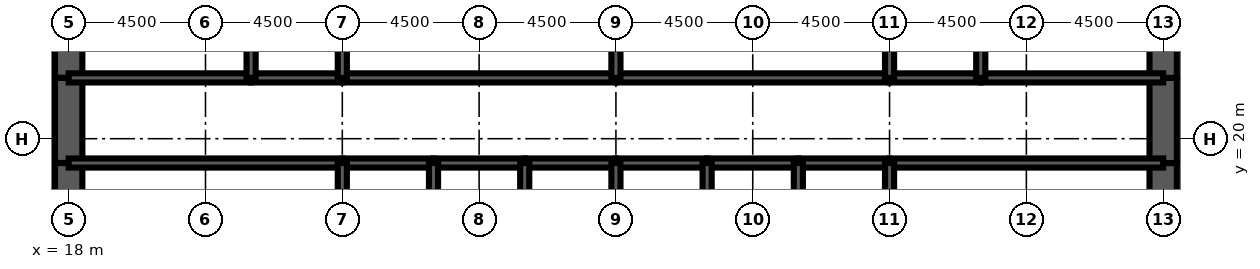
"""IFC4 building model, lengths in metres.
Left out: names, types, materials, properties, quantities, classifications, styles, units other than length and angle.
Written with IfcOpenShell. Run it as: python <this file> out.ifc"""

import sys

from ifc_helpers import new_model, si_unit, direction, frame, frame_2d, origin, place, context, subcontext, project, spatial, rectangle, extrude, element, fill, save


model = new_model("IFC4")
c1 = context("Model", 3, precision=1e-05, world=origin(), true_north=direction((0.0, 1.0)))
c2 = subcontext(c1, "Body", "Model", "MODEL_VIEW")
j1 = project(units=[si_unit("LENGTHUNIT", "METRE"), si_unit("PLANEANGLEUNIT", "RADIAN")], contexts=[c1])
p1 = place(None, origin())
s1 = spatial("IfcSite", under=j1, at=p1, CompositionType="ELEMENT")
p2 = place(p1, origin())
s2 = spatial("IfcBuilding", under=s1, at=p2, CompositionType="ELEMENT")
p3 = place(p2, origin())
s3 = spatial("IfcBuildingStorey", under=s2, at=p3, CompositionType="ELEMENT", Elevation=0.0)
p4 = place(p3, frame((18.0, 26.0, 0.0), z_axis=(0.0, 0.0, 1.0), x_axis=(0.0, -1.0, 0.0)))
e1 = element("IfcWall", 1, at=p4, inside=s3, PredefinedType="SHEAR", context=c2, shape_type="SweptSolid", body=[
    extrude(rectangle(XDim=4.0, YDim=0.9, at=frame_2d((2.0, 0.0))), origin(), (0.0, 0.0, 1.0), 6.0),
])
p5 = place(p3, frame((18.0, 22.0, 0.0), z_axis=(0.0, 0.0, 1.0), x_axis=(0.0, -1.0, 0.0)))
e2 = element("IfcWall", 2, at=p5, inside=s3, PredefinedType="SHEAR", context=c2, shape_type="SweptSolid", body=[
    extrude(rectangle(XDim=2.8, YDim=0.9, at=frame_2d((1.4, 0.0))), origin(), (0.0, 0.0, 1.0), 6.0),
])
p6 = place(p5, frame((0.6, 0.0, 0.0)))
e3 = element("IfcOpeningElement", 3, at=p6, cuts=e2, PredefinedType="OPENING", context=c2, shape_type="SweptSolid", body=[
    extrude(rectangle(XDim=1.8, YDim=2.1, at=frame_2d((0.9, 1.05))), frame((0.0, 0.46, 0.0), z_axis=(0.0, -1.0, 0.0), x_axis=(1.0, 0.0, 0.0)), (0.0, 0.0, 1.0), 0.92),
])
for number, where, z_axis, x_axis in (
    (4, (18.0, 19.2, 0.0), (0.0, 0.0, 1.0), (0.0, -1.0, 0.0)),
    (5, (54.0, 16.0, 0.0), (0.0, 0.0, 1.0), (0.0, 1.0, 0.0)),
):
    element("IfcWall", number, at=place(p3, frame(where, z_axis=z_axis, x_axis=x_axis)), inside=s3, PredefinedType="SHEAR", context=c2, shape_type="SweptSolid", body=[
        extrude(rectangle(XDim=3.2, YDim=0.9, at=frame_2d((1.6, 0.0))), origin(), (0.0, 0.0, 1.0), 6.0),
    ])
p7 = place(p3, frame((54.0, 19.2, 0.0), z_axis=(0.0, 0.0, 1.0), x_axis=(0.0, 1.0, 0.0)))
e6 = element("IfcWall", 6, at=p7, inside=s3, PredefinedType="SHEAR", context=c2, shape_type="SweptSolid", body=[
    extrude(rectangle(XDim=2.8, YDim=0.9, at=frame_2d((1.4, 0.0))), origin(), (0.0, 0.0, 1.0), 6.0),
])
p8 = place(p7, frame((0.4, 0.0, 0.0)))
e7 = element("IfcOpeningElement", 7, at=p8, cuts=e6, PredefinedType="OPENING", context=c2, shape_type="SweptSolid", body=[
    extrude(rectangle(XDim=1.8, YDim=2.1, at=frame_2d((0.9, 1.05))), frame((0.0, 0.46, 0.0), z_axis=(0.0, -1.0, 0.0), x_axis=(1.0, 0.0, 0.0)), (0.0, 0.0, 1.0), 0.92),
])
p9 = place(p3, frame((54.0, 22.0, 0.0), z_axis=(0.0, 0.0, 1.0), x_axis=(0.0, 1.0, 0.0)))
e8 = element("IfcWall", 8, at=p9, inside=s3, PredefinedType="SHEAR", context=c2, shape_type="SweptSolid", body=[
    extrude(rectangle(XDim=4.0, YDim=0.9, at=frame_2d((2.0, 0.0))), origin(), (0.0, 0.0, 1.0), 6.0),
])
p10 = place(p3, frame((18.0, 19.2, 0.0), z_axis=(0.0, 0.0, 1.0), x_axis=(1.0, 0.0, 0.0)))
e9 = element("IfcWall", 9, at=p10, inside=s3, PredefinedType="SOLIDWALL", context=c2, shape_type="SweptSolid", body=[
    extrude(rectangle(XDim=9.0, YDim=0.3, at=frame_2d((4.5, 0.0))), origin(), (0.0, 0.0, 1.0), 6.0),
])
p11 = place(p10, frame((0.65, 0.0, 0.0)))
e10 = element("IfcOpeningElement", 10, at=p11, cuts=e9, PredefinedType="OPENING", context=c2, shape_type="SweptSolid", body=[
    extrude(rectangle(XDim=1.0, YDim=2.1, at=frame_2d((0.5, 1.05))), frame((0.0, 0.16, 0.0), z_axis=(0.0, -1.0, 0.0), x_axis=(1.0, 0.0, 0.0)), (0.0, 0.0, 1.0), 0.32),
])
p12 = place(p3, frame((27.0, 19.2, 0.0), z_axis=(0.0, 0.0, 1.0), x_axis=(1.0, 0.0, 0.0)))
e11 = element("IfcWall", 11, at=p12, inside=s3, PredefinedType="SOLIDWALL", context=c2, shape_type="SweptSolid", body=[
    extrude(rectangle(XDim=3.0, YDim=0.3, at=frame_2d((1.5, 0.0))), origin(), (0.0, 0.0, 1.0), 6.0),
])
p13 = place(p12, frame((0.95, 0.0, 0.0)))
e12 = element("IfcOpeningElement", 12, at=p13, cuts=e11, PredefinedType="OPENING", context=c2, shape_type="SweptSolid", body=[
    extrude(rectangle(XDim=1.1, YDim=2.2, at=frame_2d((0.55, 1.1))), frame((0.0, 0.16, 0.0), z_axis=(0.0, -1.0, 0.0), x_axis=(1.0, 0.0, 0.0)), (0.0, 0.0, 1.0), 0.32),
])
p14 = place(p3, frame((30.0, 19.2, 0.0), z_axis=(0.0, 0.0, 1.0), x_axis=(1.0, 0.0, 0.0)))
e13 = element("IfcWall", 13, at=p14, inside=s3, PredefinedType="SOLIDWALL", context=c2, shape_type="SweptSolid", body=[
    extrude(rectangle(XDim=3.0, YDim=0.3, at=frame_2d((1.5, 0.0))), origin(), (0.0, 0.0, 1.0), 6.0),
])
p15 = place(p14, frame((0.95, 0.0, 0.0)))
e14 = element("IfcOpeningElement", 14, at=p15, cuts=e13, PredefinedType="OPENING", context=c2, shape_type="SweptSolid", body=[
    extrude(rectangle(XDim=1.1, YDim=2.2, at=frame_2d((0.55, 1.1))), frame((0.0, 0.16, 0.0), z_axis=(0.0, -1.0, 0.0), x_axis=(1.0, 0.0, 0.0)), (0.0, 0.0, 1.0), 0.32),
])
p16 = place(p3, frame((33.0, 19.2, 0.0), z_axis=(0.0, 0.0, 1.0), x_axis=(1.0, 0.0, 0.0)))
e15 = element("IfcWall", 15, at=p16, inside=s3, PredefinedType="SOLIDWALL", context=c2, shape_type="SweptSolid", body=[
    extrude(rectangle(XDim=3.0, YDim=0.3, at=frame_2d((1.5, 0.0))), origin(), (0.0, 0.0, 1.0), 6.0),
])
p17 = place(p16, frame((0.95, 0.0, 0.0)))
e16 = element("IfcOpeningElement", 16, at=p17, cuts=e15, PredefinedType="OPENING", context=c2, shape_type="SweptSolid", body=[
    extrude(rectangle(XDim=1.1, YDim=2.2, at=frame_2d((0.55, 1.1))), frame((0.0, 0.16, 0.0), z_axis=(0.0, -1.0, 0.0), x_axis=(1.0, 0.0, 0.0)), (0.0, 0.0, 1.0), 0.32),
])
p18 = place(p3, frame((36.0, 19.2, 0.0), z_axis=(0.0, 0.0, 1.0), x_axis=(1.0, 0.0, 0.0)))
e17 = element("IfcWall", 17, at=p18, inside=s3, PredefinedType="SOLIDWALL", context=c2, shape_type="SweptSolid", body=[
    extrude(rectangle(XDim=3.0, YDim=0.3, at=frame_2d((1.5, 0.0))), origin(), (0.0, 0.0, 1.0), 6.0),
])
p19 = place(p18, frame((0.95, 0.0, 0.0)))
e18 = element("IfcOpeningElement", 18, at=p19, cuts=e17, PredefinedType="OPENING", context=c2, shape_type="SweptSolid", body=[
    extrude(rectangle(XDim=1.1, YDim=2.2, at=frame_2d((0.55, 1.1))), frame((0.0, 0.16, 0.0), z_axis=(0.0, -1.0, 0.0), x_axis=(1.0, 0.0, 0.0)), (0.0, 0.0, 1.0), 0.32),
])
p20 = place(p3, frame((39.0, 19.2, 0.0), z_axis=(0.0, 0.0, 1.0), x_axis=(1.0, 0.0, 0.0)))
e19 = element("IfcWall", 19, at=p20, inside=s3, PredefinedType="SOLIDWALL", context=c2, shape_type="SweptSolid", body=[
    extrude(rectangle(XDim=3.0, YDim=0.3, at=frame_2d((1.5, 0.0))), origin(), (0.0, 0.0, 1.0), 6.0),
])
p21 = place(p20, frame((0.95, 0.0, 0.0)))
e20 = element("IfcOpeningElement", 20, at=p21, cuts=e19, PredefinedType="OPENING", context=c2, shape_type="SweptSolid", body=[
    extrude(rectangle(XDim=1.1, YDim=2.2, at=frame_2d((0.55, 1.1))), frame((0.0, 0.16, 0.0), z_axis=(0.0, -1.0, 0.0), x_axis=(1.0, 0.0, 0.0)), (0.0, 0.0, 1.0), 0.32),
])
p22 = place(p3, frame((42.0, 19.2, 0.0), z_axis=(0.0, 0.0, 1.0), x_axis=(1.0, 0.0, 0.0)))
e21 = element("IfcWall", 21, at=p22, inside=s3, PredefinedType="SOLIDWALL", context=c2, shape_type="SweptSolid", body=[
    extrude(rectangle(XDim=3.0, YDim=0.3, at=frame_2d((1.5, 0.0))), origin(), (0.0, 0.0, 1.0), 6.0),
])
p23 = place(p22, frame((0.95, 0.0, 0.0)))
e22 = element("IfcOpeningElement", 22, at=p23, cuts=e21, PredefinedType="OPENING", context=c2, shape_type="SweptSolid", body=[
    extrude(rectangle(XDim=1.1, YDim=2.2, at=frame_2d((0.55, 1.1))), frame((0.0, 0.16, 0.0), z_axis=(0.0, -1.0, 0.0), x_axis=(1.0, 0.0, 0.0)), (0.0, 0.0, 1.0), 0.32),
])
p24 = place(p3, frame((45.0, 19.2, 0.0), z_axis=(0.0, 0.0, 1.0), x_axis=(1.0, 0.0, 0.0)))
e23 = element("IfcWall", 23, at=p24, inside=s3, PredefinedType="SOLIDWALL", context=c2, shape_type="SweptSolid", body=[
    extrude(rectangle(XDim=9.0, YDim=0.3, at=frame_2d((4.5, 0.0))), origin(), (0.0, 0.0, 1.0), 6.0),
])
p25 = place(p24, frame((7.35, 0.0, 0.0)))
e24 = element("IfcOpeningElement", 24, at=p25, cuts=e23, PredefinedType="OPENING", context=c2, shape_type="SweptSolid", body=[
    extrude(rectangle(XDim=1.0, YDim=2.1, at=frame_2d((0.5, 1.05))), frame((0.0, 0.16, 0.0), z_axis=(0.0, -1.0, 0.0), x_axis=(1.0, 0.0, 0.0)), (0.0, 0.0, 1.0), 0.32),
])
p26 = place(p3, frame((18.0, 22.0, 0.0), z_axis=(0.0, 0.0, 1.0), x_axis=(1.0, 0.0, 0.0)))
e25 = element("IfcWall", 25, at=p26, inside=s3, PredefinedType="SOLIDWALL", context=c2, shape_type="SweptSolid", body=[
    extrude(rectangle(XDim=6.0, YDim=0.3, at=frame_2d((3.0, 0.0))), origin(), (0.0, 0.0, 1.0), 6.0),
])
p27 = place(p26, frame((2.0, 0.0, 0.0)))
e26 = element("IfcOpeningElement", 26, at=p27, cuts=e25, PredefinedType="OPENING", context=c2, shape_type="SweptSolid", body=[
    extrude(rectangle(XDim=1.0, YDim=2.1, at=frame_2d((0.5, 1.05))), frame((0.0, 0.16, 0.0), z_axis=(0.0, -1.0, 0.0), x_axis=(1.0, 0.0, 0.0)), (0.0, 0.0, 1.0), 0.32),
])
p28 = place(p3, frame((24.0, 22.0, 0.0), z_axis=(0.0, 0.0, 1.0), x_axis=(1.0, 0.0, 0.0)))
e27 = element("IfcWall", 27, at=p28, inside=s3, PredefinedType="SOLIDWALL", context=c2, shape_type="SweptSolid", body=[
    extrude(rectangle(XDim=3.0, YDim=0.3, at=frame_2d((1.5, 0.0))), origin(), (0.0, 0.0, 1.0), 6.0),
])
p29 = place(p28, frame((1.0, 0.0, 0.0)))
e28 = element("IfcOpeningElement", 28, at=p29, cuts=e27, PredefinedType="OPENING", context=c2, shape_type="SweptSolid", body=[
    extrude(rectangle(XDim=1.0, YDim=2.1, at=frame_2d((0.5, 1.05))), frame((0.0, 0.16, 0.0), z_axis=(0.0, -1.0, 0.0), x_axis=(1.0, 0.0, 0.0)), (0.0, 0.0, 1.0), 0.32),
])
p30 = place(p3, frame((27.0, 22.0, 0.0), z_axis=(0.0, 0.0, 1.0), x_axis=(1.0, 0.0, 0.0)))
e29 = element("IfcWall", 29, at=p30, inside=s3, PredefinedType="SOLIDWALL", context=c2, shape_type="SweptSolid", body=[
    extrude(rectangle(XDim=9.0, YDim=0.3, at=frame_2d((4.5, 0.0))), origin(), (0.0, 0.0, 1.0), 6.0),
])
p31 = place(p30, frame((4.0, 0.0, 0.0)))
e30 = element("IfcOpeningElement", 30, at=p31, cuts=e29, PredefinedType="OPENING", context=c2, shape_type="SweptSolid", body=[
    extrude(rectangle(XDim=1.0, YDim=2.1, at=frame_2d((0.5, 1.05))), frame((0.0, 0.16, 0.0), z_axis=(0.0, -1.0, 0.0), x_axis=(1.0, 0.0, 0.0)), (0.0, 0.0, 1.0), 0.32),
])
p32 = place(p3, frame((36.0, 22.0, 0.0), z_axis=(0.0, 0.0, 1.0), x_axis=(1.0, 0.0, 0.0)))
e31 = element("IfcWall", 31, at=p32, inside=s3, PredefinedType="SOLIDWALL", context=c2, shape_type="SweptSolid", body=[
    extrude(rectangle(XDim=9.0, YDim=0.3, at=frame_2d((4.5, 0.0))), origin(), (0.0, 0.0, 1.0), 6.0),
])
p33 = place(p32, frame((4.0, 0.0, 0.0)))
e32 = element("IfcOpeningElement", 32, at=p33, cuts=e31, PredefinedType="OPENING", context=c2, shape_type="SweptSolid", body=[
    extrude(rectangle(XDim=1.0, YDim=2.1, at=frame_2d((0.5, 1.05))), frame((0.0, 0.16, 0.0), z_axis=(0.0, -1.0, 0.0), x_axis=(1.0, 0.0, 0.0)), (0.0, 0.0, 1.0), 0.32),
])
p34 = place(p3, frame((45.0, 22.0, 0.0), z_axis=(0.0, 0.0, 1.0), x_axis=(1.0, 0.0, 0.0)))
e33 = element("IfcWall", 33, at=p34, inside=s3, PredefinedType="SOLIDWALL", context=c2, shape_type="SweptSolid", body=[
    extrude(rectangle(XDim=3.0, YDim=0.3, at=frame_2d((1.5, 0.0))), origin(), (0.0, 0.0, 1.0), 6.0),
])
p35 = place(p34, frame((1.0, 0.0, 0.0)))
e34 = element("IfcOpeningElement", 34, at=p35, cuts=e33, PredefinedType="OPENING", context=c2, shape_type="SweptSolid", body=[
    extrude(rectangle(XDim=1.0, YDim=2.1, at=frame_2d((0.5, 1.05))), frame((0.0, 0.16, 0.0), z_axis=(0.0, -1.0, 0.0), x_axis=(1.0, 0.0, 0.0)), (0.0, 0.0, 1.0), 0.32),
])
p36 = place(p3, frame((48.0, 22.0, 0.0), z_axis=(0.0, 0.0, 1.0), x_axis=(1.0, 0.0, 0.0)))
e35 = element("IfcWall", 35, at=p36, inside=s3, PredefinedType="SOLIDWALL", context=c2, shape_type="SweptSolid", body=[
    extrude(rectangle(XDim=6.0, YDim=0.3, at=frame_2d((3.0, 0.0))), origin(), (0.0, 0.0, 1.0), 6.0),
])
p37 = place(p36, frame((2.0, 0.0, 0.0)))
e36 = element("IfcOpeningElement", 36, at=p37, cuts=e35, PredefinedType="OPENING", context=c2, shape_type="SweptSolid", body=[
    extrude(rectangle(XDim=1.0, YDim=2.1, at=frame_2d((0.5, 1.05))), frame((0.0, 0.16, 0.0), z_axis=(0.0, -1.0, 0.0), x_axis=(1.0, 0.0, 0.0)), (0.0, 0.0, 1.0), 0.32),
])
p38 = place(p36, frame((4.3, 0.0, 0.0)))
e37 = element("IfcOpeningElement", 37, at=p38, cuts=e35, PredefinedType="OPENING", context=c2, shape_type="SweptSolid", body=[
    extrude(rectangle(XDim=1.0, YDim=2.1, at=frame_2d((0.5, 1.05))), frame((0.0, 0.16, 0.0), z_axis=(0.0, -1.0, 0.0), x_axis=(1.0, 0.0, 0.0)), (0.0, 0.0, 1.0), 0.32),
])
for number, where, z_axis, x_axis in (
    (38, (27.0, 16.0, 0.0), (0.0, 0.0, 1.0), (0.0, 1.0, 0.0)),
    (39, (30.0, 16.0, 0.0), (0.0, 0.0, 1.0), (0.0, 1.0, 0.0)),
    (40, (33.0, 16.0, 0.0), (0.0, 0.0, 1.0), (0.0, 1.0, 0.0)),
    (41, (36.0, 16.0, 0.0), (0.0, 0.0, 1.0), (0.0, 1.0, 0.0)),
    (42, (39.0, 16.0, 0.0), (0.0, 0.0, 1.0), (0.0, 1.0, 0.0)),
    (43, (42.0, 16.0, 0.0), (0.0, 0.0, 1.0), (0.0, 1.0, 0.0)),
    (44, (45.0, 16.0, 0.0), (0.0, 0.0, 1.0), (0.0, 1.0, 0.0)),
):
    element("IfcWall", number, at=place(p3, frame(where, z_axis=z_axis, x_axis=x_axis)), inside=s3, PredefinedType="SOLIDWALL", context=c2, shape_type="SweptSolid", body=[
        extrude(rectangle(XDim=3.2, YDim=0.3, at=frame_2d((1.6, 0.0))), origin(), (0.0, 0.0, 1.0), 6.0),
    ])
for number, where, z_axis, x_axis in (
    (45, (24.0, 22.0, 0.0), (0.0, 0.0, 1.0), (0.0, 1.0, 0.0)),
    (46, (27.0, 22.0, 0.0), (0.0, 0.0, 1.0), (0.0, 1.0, 0.0)),
    (47, (36.0, 22.0, 0.0), (0.0, 0.0, 1.0), (0.0, 1.0, 0.0)),
    (48, (45.0, 22.0, 0.0), (0.0, 0.0, 1.0), (0.0, 1.0, 0.0)),
    (49, (48.0, 22.0, 0.0), (0.0, 0.0, 1.0), (0.0, 1.0, 0.0)),
):
    element("IfcWall", number, at=place(p3, frame(where, z_axis=z_axis, x_axis=x_axis)), inside=s3, PredefinedType="SOLIDWALL", context=c2, shape_type="SweptSolid", body=[
        extrude(rectangle(XDim=4.0, YDim=0.3, at=frame_2d((2.0, 0.0))), origin(), (0.0, 0.0, 1.0), 6.0),
    ])
p39 = place(p3, frame((39.0, 22.15, 0.0), z_axis=(0.0, 0.0, 1.0), x_axis=(0.0, 1.0, 0.0)))
e50 = element("IfcWall", 50, at=p39, inside=s3, PredefinedType="PARTITIONING", context=c2, shape_type="SweptSolid", body=[
    extrude(rectangle(XDim=3.7, YDim=0.15, at=frame_2d((1.85, 0.0))), origin(), (0.0, 0.0, 1.0), 3.0),
])
p40 = place(p39, frame((2.2, 0.0, 0.0)))
e51 = element("IfcOpeningElement", 51, at=p40, cuts=e50, PredefinedType="OPENING", context=c2, shape_type="SweptSolid", body=[
    extrude(rectangle(XDim=1.0, YDim=2.1, at=frame_2d((0.5, 1.05))), frame((0.0, 0.085, 0.0), z_axis=(0.0, -1.0, 0.0), x_axis=(1.0, 0.0, 0.0)), (0.0, 0.0, 1.0), 0.17),
])
p41 = place(p3, frame((51.975, 22.15, 0.0), z_axis=(0.0, 0.0, 1.0), x_axis=(0.0, 1.0, 0.0)))
e52 = element("IfcWall", 52, at=p41, inside=s3, PredefinedType="PARTITIONING", context=c2, shape_type="SweptSolid", body=[
    extrude(rectangle(XDim=3.7, YDim=0.15, at=frame_2d((1.85, 0.0))), origin(), (0.0, 0.0, 1.0), 3.0),
])
p42 = place(p13, origin())
e53 = element("IfcDoor", 53, at=p42, inside=s3, OperationType="DOUBLE_DOOR_SLIDING", PredefinedType="USERDEFINED", context=c2, shape_type="SweptSolid", body=[
    extrude(rectangle(XDim=1.1, YDim=2.2, at=frame_2d((0.55, 1.1))), frame((0.0, 0.025, 0.0), z_axis=(0.0, -1.0, 0.0), x_axis=(1.0, 0.0, 0.0)), (0.0, 0.0, 1.0), 0.05),
])
fill(e12, e53)
p43 = place(p21, origin())
e54 = element("IfcDoor", 54, at=p43, inside=s3, OperationType="DOUBLE_DOOR_SLIDING", PredefinedType="USERDEFINED", context=c2, shape_type="SweptSolid", body=[
    extrude(rectangle(XDim=1.1, YDim=2.2, at=frame_2d((0.55, 1.1))), frame((0.0, 0.025, 0.0), z_axis=(0.0, -1.0, 0.0), x_axis=(1.0, 0.0, 0.0)), (0.0, 0.0, 1.0), 0.05),
])
fill(e20, e54)
p44 = place(p23, origin())
e55 = element("IfcDoor", 55, at=p44, inside=s3, OperationType="DOUBLE_DOOR_SLIDING", PredefinedType="USERDEFINED", context=c2, shape_type="SweptSolid", body=[
    extrude(rectangle(XDim=1.1, YDim=2.2, at=frame_2d((0.55, 1.1))), frame((0.0, 0.025, 0.0), z_axis=(0.0, -1.0, 0.0), x_axis=(1.0, 0.0, 0.0)), (0.0, 0.0, 1.0), 0.05),
])
fill(e22, e55)
p45 = place(p15, origin())
e56 = element("IfcDoor", 56, at=p45, inside=s3, OperationType="DOUBLE_DOOR_SLIDING", PredefinedType="USERDEFINED", context=c2, shape_type="SweptSolid", body=[
    extrude(rectangle(XDim=1.1, YDim=2.2, at=frame_2d((0.55, 1.1))), frame((0.0, 0.025, 0.0), z_axis=(0.0, -1.0, 0.0), x_axis=(1.0, 0.0, 0.0)), (0.0, 0.0, 1.0), 0.05),
])
fill(e14, e56)
p46 = place(p17, origin())
e57 = element("IfcDoor", 57, at=p46, inside=s3, OperationType="DOUBLE_DOOR_SLIDING", PredefinedType="USERDEFINED", context=c2, shape_type="SweptSolid", body=[
    extrude(rectangle(XDim=1.1, YDim=2.2, at=frame_2d((0.55, 1.1))), frame((0.0, 0.025, 0.0), z_axis=(0.0, -1.0, 0.0), x_axis=(1.0, 0.0, 0.0)), (0.0, 0.0, 1.0), 0.05),
])
fill(e16, e57)
p47 = place(p19, origin())
e58 = element("IfcDoor", 58, at=p47, inside=s3, OperationType="DOUBLE_DOOR_SLIDING", PredefinedType="USERDEFINED", context=c2, shape_type="SweptSolid", body=[
    extrude(rectangle(XDim=1.1, YDim=2.2, at=frame_2d((0.55, 1.1))), frame((0.0, 0.025, 0.0), z_axis=(0.0, -1.0, 0.0), x_axis=(1.0, 0.0, 0.0)), (0.0, 0.0, 1.0), 0.05),
])
fill(e18, e58)
p48 = place(p11, origin())
e59 = element("IfcDoor", 59, at=p48, inside=s3, OperationType="SINGLE_SWING_LEFT", PredefinedType="DOOR", context=c2, shape_type="SweptSolid", body=[
    extrude(rectangle(XDim=1.0, YDim=2.1, at=frame_2d((0.5, 1.05))), frame((0.0, 0.025, 0.0), z_axis=(0.0, -1.0, 0.0), x_axis=(1.0, 0.0, 0.0)), (0.0, 0.0, 1.0), 0.05),
])
fill(e10, e59)
p49 = place(p25, origin())
e60 = element("IfcDoor", 60, at=p49, inside=s3, OperationType="SINGLE_SWING_RIGHT", PredefinedType="DOOR", context=c2, shape_type="SweptSolid", body=[
    extrude(rectangle(XDim=1.0, YDim=2.1, at=frame_2d((0.5, 1.05))), frame((0.0, 0.025, 0.0), z_axis=(0.0, -1.0, 0.0), x_axis=(1.0, 0.0, 0.0)), (0.0, 0.0, 1.0), 0.05),
])
fill(e24, e60)
p50 = place(p6, origin())
e61 = element("IfcDoor", 61, at=p50, inside=s3, OperationType="SINGLE_SWING_LEFT", PredefinedType="DOOR", context=c2, shape_type="SweptSolid", body=[
    extrude(rectangle(XDim=1.8, YDim=2.1, at=frame_2d((0.9, 1.05))), frame((0.0, 0.45, 0.0), z_axis=(0.0, -1.0, 0.0), x_axis=(1.0, 0.0, 0.0)), (0.0, 0.0, 1.0), 0.899),
])
fill(e3, e61)
p51 = place(p8, origin())
e62 = element("IfcDoor", 62, at=p51, inside=s3, OperationType="SINGLE_SWING_LEFT", PredefinedType="DOOR", context=c2, shape_type="SweptSolid", body=[
    extrude(rectangle(XDim=1.8, YDim=2.1, at=frame_2d((0.9, 1.05))), frame((0.0, 0.45, 0.0), z_axis=(0.0, -1.0, 0.0), x_axis=(1.0, 0.0, 0.0)), (0.0, 0.0, 1.0), 0.899),
])
fill(e7, e62)
p52 = place(p27, origin())
e63 = element("IfcDoor", 63, at=p52, inside=s3, OperationType="SINGLE_SWING_LEFT", PredefinedType="DOOR", context=c2, shape_type="SweptSolid", body=[
    extrude(rectangle(XDim=1.0, YDim=2.1, at=frame_2d((0.5, 1.05))), frame((0.0, 0.025, 0.0), z_axis=(0.0, -1.0, 0.0), x_axis=(1.0, 0.0, 0.0)), (0.0, 0.0, 1.0), 0.05),
])
fill(e26, e63)
p53 = place(p29, origin())
e64 = element("IfcDoor", 64, at=p53, inside=s3, OperationType="SINGLE_SWING_LEFT", PredefinedType="DOOR", context=c2, shape_type="SweptSolid", body=[
    extrude(rectangle(XDim=1.0, YDim=2.1, at=frame_2d((0.5, 1.05))), frame((0.0, 0.025, 0.0), z_axis=(0.0, -1.0, 0.0), x_axis=(1.0, 0.0, 0.0)), (0.0, 0.0, 1.0), 0.05),
])
fill(e28, e64)
p54 = place(p31, origin())
e65 = element("IfcDoor", 65, at=p54, inside=s3, OperationType="SINGLE_SWING_LEFT", PredefinedType="DOOR", context=c2, shape_type="SweptSolid", body=[
    extrude(rectangle(XDim=1.0, YDim=2.1, at=frame_2d((0.5, 1.05))), frame((0.0, 0.025, 0.0), z_axis=(0.0, -1.0, 0.0), x_axis=(1.0, 0.0, 0.0)), (0.0, 0.0, 1.0), 0.05),
])
fill(e30, e65)
p55 = place(p33, origin())
e66 = element("IfcDoor", 66, at=p55, inside=s3, OperationType="SINGLE_SWING_LEFT", PredefinedType="DOOR", context=c2, shape_type="SweptSolid", body=[
    extrude(rectangle(XDim=1.0, YDim=2.1, at=frame_2d((0.5, 1.05))), frame((0.0, 0.025, 0.0), z_axis=(0.0, -1.0, 0.0), x_axis=(1.0, 0.0, 0.0)), (0.0, 0.0, 1.0), 0.05),
])
fill(e32, e66)
p56 = place(p35, origin())
e67 = element("IfcDoor", 67, at=p56, inside=s3, OperationType="SINGLE_SWING_LEFT", PredefinedType="DOOR", context=c2, shape_type="SweptSolid", body=[
    extrude(rectangle(XDim=1.0, YDim=2.1, at=frame_2d((0.5, 1.05))), frame((0.0, 0.025, 0.0), z_axis=(0.0, -1.0, 0.0), x_axis=(1.0, 0.0, 0.0)), (0.0, 0.0, 1.0), 0.05),
])
fill(e34, e67)
p57 = place(p37, origin())
e68 = element("IfcDoor", 68, at=p57, inside=s3, OperationType="SINGLE_SWING_LEFT", PredefinedType="DOOR", context=c2, shape_type="SweptSolid", body=[
    extrude(rectangle(XDim=1.0, YDim=2.1, at=frame_2d((0.5, 1.05))), frame((0.0, 0.025, 0.0), z_axis=(0.0, -1.0, 0.0), x_axis=(1.0, 0.0, 0.0)), (0.0, 0.0, 1.0), 0.05),
])
fill(e36, e68)
p58 = place(p38, origin())
e69 = element("IfcDoor", 69, at=p58, inside=s3, OperationType="SINGLE_SWING_RIGHT", PredefinedType="DOOR", context=c2, shape_type="SweptSolid", body=[
    extrude(rectangle(XDim=1.0, YDim=2.1, at=frame_2d((0.5, 1.05))), frame((0.0, 0.025, 0.0), z_axis=(0.0, -1.0, 0.0), x_axis=(1.0, 0.0, 0.0)), (0.0, 0.0, 1.0), 0.05),
])
fill(e37, e69)
save(model, sys.argv[1])
